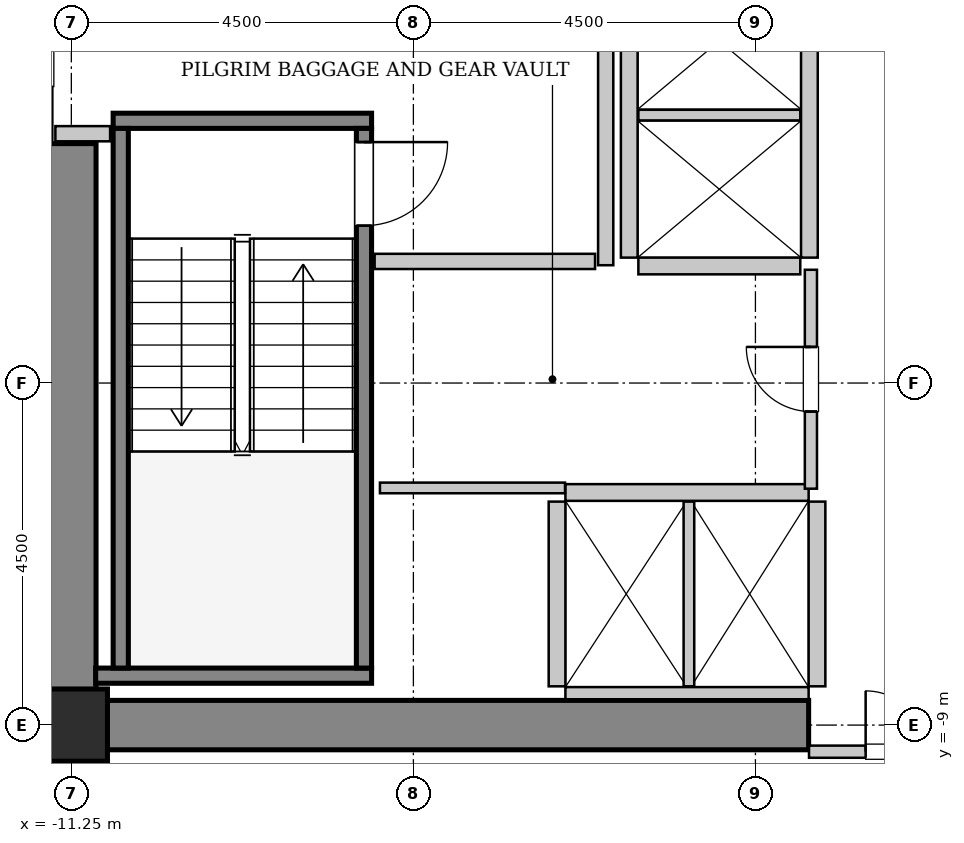
"""IFC4 building model, lengths in metres.
Left out: names, types, materials, properties, quantities, classifications, styles, units other than length and angle.
Written with IfcOpenShell. Run it as: python <this file> out.ifc"""

import sys

from ifc_helpers import new_model, si_unit, direction, frame, frame_2d, origin, origin_2d, place, context, subcontext, project, spatial, rectangle, hollow_rectangle, extrude, source, transform, mapped, element, fill, save


model = new_model("IFC4")
c1 = context("Model", 3, precision=1e-05, world=origin(), true_north=direction((0.0, 1.0)))
c2 = subcontext(c1, "Body", "Model", "MODEL_VIEW")
j1 = project(units=[si_unit("LENGTHUNIT", "METRE"), si_unit("PLANEANGLEUNIT", "RADIAN")], contexts=[c1])
p1 = place(None, origin())
s1 = spatial("IfcSite", under=j1, at=p1, CompositionType="ELEMENT")
p2 = place(p1, origin())
s2 = spatial("IfcBuilding", under=s1, at=p2, CompositionType="ELEMENT")
p3 = place(p2, frame((0.0, 0.0, 52.0)))
s3 = spatial("IfcBuildingStorey", under=s2, at=p3, CompositionType="ELEMENT", Elevation=52.0)
m1 = source(origin(), c2, "Body", "SweptSolid", [
    extrude(rectangle(XDim=10.025, YDim=0.65, at=frame_2d((5.012, 0.0))), origin(), (0.0, 0.0, 1.0), 3.8),
])
p4 = place(p3, frame((-11.575, -9.0, 0.0), z_axis=(0.0, 0.0, 1.0), x_axis=(1.0, 0.0, 0.0)))
e1 = element("IfcWall", 1, at=p4, inside=s3, PredefinedType="SHEAR", context=c2, shape_type="MappedRepresentation", body=[
    mapped(m1, transform((0.0, 0.0, 0.0), x_axis=(1.0, 0.0, 0.0), y_axis=(0.0, 1.0, 0.0), z_axis=(0.0, 0.0, 1.0), scale=1.0)),
])
m2 = source(origin(), c2, "Body", "SweptSolid", [
    extrude(rectangle(XDim=7.325, YDim=0.65, at=frame_2d((3.663, 0.0))), origin(), (0.0, 0.0, 1.0), 3.8),
])
p5 = place(p3, frame((-11.25, -8.675, 0.0), z_axis=(0.0, 0.0, 1.0), x_axis=(0.0, 1.0, 0.0)))
e2 = element("IfcWall", 2, at=p5, inside=s3, PredefinedType="SHEAR", context=c2, shape_type="MappedRepresentation", body=[
    mapped(m2, transform((0.0, 0.0, 0.0), x_axis=(1.0, 0.0, 0.0), y_axis=(0.0, 1.0, 0.0), z_axis=(0.0, 0.0, 1.0), scale=1.0)),
])
m3 = source(origin(), c2, "Body", "SweptSolid", [
    extrude(hollow_rectangle(XDim=0.95, YDim=0.95, WallThickness=0.045, InnerFilletRadius=0.045, OuterFilletRadius=0.09, at=origin_2d()), origin(), (0.0, 0.0, 1.0), 3.8),
])
p6 = place(p3, frame((-11.25, -9.0, 0.0), z_axis=(0.0, 0.0, 1.0), x_axis=(1.0, 0.0, 0.0)))
e3 = element("IfcColumn", 3, at=p6, inside=s3, PredefinedType="COLUMN", context=c2, shape_type="MappedRepresentation", body=[
    mapped(m3, transform((0.0, 0.0, 0.0), x_axis=(1.0, 0.0, 0.0), y_axis=(0.0, 1.0, 0.0), z_axis=(0.0, 0.0, 1.0), scale=1.0)),
])
m4 = source(origin(), c2, "Body", "SweptSolid", [
    extrude(rectangle(XDim=3.4, YDim=0.2, at=frame_2d((1.7, 0.0))), origin(), (0.0, 0.0, 1.0), 3.8),
])
p7 = place(p3, frame((-10.7, -1.05, 0.0), z_axis=(0.0, 0.0, 1.0), x_axis=(1.0, 0.0, 0.0)))
e4 = element("IfcWall", 4, at=p7, inside=s3, PredefinedType="SOLIDWALL", context=c2, shape_type="MappedRepresentation", body=[
    mapped(m4, transform((0.0, 0.0, 0.0), x_axis=(1.0, 0.0, 0.0), y_axis=(0.0, 1.0, 0.0), z_axis=(0.0, 0.0, 1.0), scale=1.0)),
])
m5 = source(origin(), c2, "Body", "SweptSolid", [
    extrude(rectangle(XDim=3.63, YDim=0.2, at=frame_2d((1.815, 0.0))), origin(), (0.0, 0.0, 1.0), 3.8),
])
p8 = place(p3, frame((-10.93, -8.35, 0.0), z_axis=(0.0, 0.0, 1.0), x_axis=(1.0, 0.0, 0.0)))
e5 = element("IfcWall", 5, at=p8, inside=s3, PredefinedType="SOLIDWALL", context=c2, shape_type="MappedRepresentation", body=[
    mapped(m5, transform((0.0, 0.0, 0.0), x_axis=(1.0, 0.0, 0.0), y_axis=(0.0, 1.0, 0.0), z_axis=(0.0, 0.0, 1.0), scale=1.0)),
])
m6 = source(origin(), c2, "Body", "SweptSolid", [
    extrude(rectangle(XDim=7.1, YDim=0.2, at=frame_2d((3.55, 0.0))), origin(), (0.0, 0.0, 1.0), 3.8),
])
p9 = place(p3, frame((-10.6, -1.15, 0.0), z_axis=(0.0, 0.0, 1.0), x_axis=(0.0, -1.0, 0.0)))
e6 = element("IfcWall", 6, at=p9, inside=s3, PredefinedType="SOLIDWALL", context=c2, shape_type="MappedRepresentation", body=[
    mapped(m6, transform((0.0, 0.0, 0.0), x_axis=(1.0, 0.0, 0.0), y_axis=(0.0, 1.0, 0.0), z_axis=(0.0, 0.0, 1.0), scale=1.0)),
])
p10 = place(p3, frame((-7.4, -1.15, 0.0), z_axis=(0.0, 0.0, 1.0), x_axis=(0.0, -1.0, 0.0)))
e7 = element("IfcWall", 7, at=p10, inside=s3, PredefinedType="SOLIDWALL", context=c2, shape_type="MappedRepresentation", body=[
    mapped(m6, transform((0.0, 0.0, 0.0), x_axis=(1.0, 0.0, 0.0), y_axis=(0.0, 1.0, 0.0), z_axis=(0.0, 0.0, 1.0), scale=1.0)),
])
p11 = place(p10, frame((0.18, 0.0, 0.0)))
e8 = element("IfcOpeningElement", 8, at=p11, cuts=e7, PredefinedType="OPENING", context=c2, shape_type="SweptSolid", body=[
    extrude(rectangle(XDim=1.1, YDim=2.15, at=frame_2d((0.55, 1.075))), frame((0.0, 0.11, 0.0), z_axis=(0.0, -1.0, 0.0), x_axis=(1.0, 0.0, 0.0)), (0.0, 0.0, 1.0), 0.22),
])
m7 = source(origin(), c2, "Body", "SweptSolid", [
    extrude(rectangle(XDim=3.2, YDim=0.22, at=frame_2d((1.6, 0.0))), origin(), (0.0, 0.0, 1.0), 3.535),
])
p12 = place(p3, frame((-1.55, -5.94, 0.0), z_axis=(0.0, 0.0, 1.0), x_axis=(-1.0, 0.0, 0.0)))
e9 = element("IfcWall", 9, at=p12, inside=s3, PredefinedType="SOLIDWALL", context=c2, shape_type="MappedRepresentation", body=[
    mapped(m7, transform((0.0, 0.0, 0.0), x_axis=(1.0, 0.0, 0.0), y_axis=(0.0, 1.0, 0.0), z_axis=(0.0, 0.0, 1.0), scale=1.0)),
])
m8 = source(origin(), c2, "Body", "SweptSolid", [
    extrude(rectangle(XDim=3.2, YDim=0.16, at=frame_2d((1.6, 0.0))), origin(), (0.0, 0.0, 1.0), 2.425),
])
p13 = place(p3, frame((-4.75, -8.58, 0.0), z_axis=(0.0, 0.0, 1.0), x_axis=(1.0, 0.0, 0.0)))
e10 = element("IfcWall", 10, at=p13, inside=s3, PredefinedType="PARTITIONING", context=c2, shape_type="MappedRepresentation", body=[
    mapped(m8, transform((0.0, 0.0, 0.0), x_axis=(1.0, 0.0, 0.0), y_axis=(0.0, 1.0, 0.0), z_axis=(0.0, 0.0, 1.0), scale=1.0)),
])
m9 = source(origin(), c2, "Body", "SweptSolid", [
    extrude(rectangle(XDim=2.43, YDim=0.22, at=frame_2d((1.215, 0.0))), origin(), (0.0, 0.0, 1.0), 3.535),
])
p14 = place(p3, frame((-4.86, -6.06, 0.0), z_axis=(0.0, 0.0, 1.0), x_axis=(0.0, -1.0, 0.0)))
e11 = element("IfcWall", 11, at=p14, inside=s3, PredefinedType="SOLIDWALL", context=c2, shape_type="MappedRepresentation", body=[
    mapped(m9, transform((0.0, 0.0, 0.0), x_axis=(1.0, 0.0, 0.0), y_axis=(0.0, 1.0, 0.0), z_axis=(0.0, 0.0, 1.0), scale=1.0)),
])
m10 = source(origin(), c2, "Body", "SweptSolid", [
    extrude(rectangle(XDim=2.43, YDim=0.14, at=frame_2d((1.215, 0.0))), origin(), (0.0, 0.0, 1.0), 3.535),
])
p15 = place(p3, frame((-3.125, -8.49, 0.0), z_axis=(0.0, 0.0, 1.0), x_axis=(0.0, 1.0, 0.0)))
e12 = element("IfcWall", 12, at=p15, inside=s3, PredefinedType="PARTITIONING", context=c2, shape_type="MappedRepresentation", body=[
    mapped(m10, transform((0.0, 0.0, 0.0), x_axis=(1.0, 0.0, 0.0), y_axis=(0.0, 1.0, 0.0), z_axis=(0.0, 0.0, 1.0), scale=1.0)),
])
p16 = place(p3, frame((-1.44, -8.49, 0.0), z_axis=(0.0, 0.0, 1.0), x_axis=(0.0, 1.0, 0.0)))
e13 = element("IfcWall", 13, at=p16, inside=s3, PredefinedType="SOLIDWALL", context=c2, shape_type="MappedRepresentation", body=[
    mapped(m9, transform((0.0, 0.0, 0.0), x_axis=(1.0, 0.0, 0.0), y_axis=(0.0, 1.0, 0.0), z_axis=(0.0, 0.0, 1.0), scale=1.0)),
])
m11 = source(origin(), c2, "Body", "SweptSolid", [
    extrude(rectangle(XDim=5.7, YDim=0.22, at=frame_2d((2.85, 0.0))), origin(), (0.0, 0.0, 1.0), 3.535),
])
for number, where, z_axis, x_axis in (
    (14, (-1.54, -2.85, 0.0), (0.0, 0.0, 1.0), (0.0, 1.0, 0.0)),
    (15, (-3.91, 2.85, 0.0), (0.0, 0.0, 1.0), (0.0, -1.0, 0.0)),
):
    element("IfcWall", number, at=place(p3, frame(where, z_axis=z_axis, x_axis=x_axis)), inside=s3, PredefinedType="SOLIDWALL", context=c2, shape_type="MappedRepresentation", body=[
        mapped(m11, transform((0.0, 0.0, 0.0), x_axis=(1.0, 0.0, 0.0), y_axis=(0.0, 1.0, 0.0), z_axis=(0.0, 0.0, 1.0), scale=1.0)),
    ])
m12 = source(origin(), c2, "Body", "SweptSolid", [
    extrude(rectangle(XDim=2.13, YDim=0.22, at=frame_2d((1.065, 0.0))), origin(), (0.0, 0.0, 1.0), 3.535),
])
p17 = place(p3, frame((-3.79, -2.96, 0.0), z_axis=(0.0, 0.0, 1.0), x_axis=(1.0, 0.0, 0.0)))
e16 = element("IfcWall", 16, at=p17, inside=s3, PredefinedType="SOLIDWALL", context=c2, shape_type="MappedRepresentation", body=[
    mapped(m12, transform((0.0, 0.0, 0.0), x_axis=(1.0, 0.0, 0.0), y_axis=(0.0, 1.0, 0.0), z_axis=(0.0, 0.0, 1.0), scale=1.0)),
])
m13 = source(origin(), c2, "Body", "SweptSolid", [
    extrude(rectangle(XDim=2.13, YDim=0.14, at=frame_2d((1.065, 0.0))), origin(), (0.0, 0.0, 1.0), 3.535),
])
p18 = place(p3, frame((-3.79, -0.975, 0.0), z_axis=(0.0, 0.0, 1.0), x_axis=(1.0, 0.0, 0.0)))
e17 = element("IfcWall", 17, at=p18, inside=s3, PredefinedType="PARTITIONING", context=c2, shape_type="MappedRepresentation", body=[
    mapped(m13, transform((0.0, 0.0, 0.0), x_axis=(1.0, 0.0, 0.0), y_axis=(0.0, 1.0, 0.0), z_axis=(0.0, 0.0, 1.0), scale=1.0)),
])
m14 = source(origin(), c2, "Body", "SweptSolid", [
    extrude(rectangle(XDim=5.9, YDim=0.2, at=frame_2d((2.95, 0.0))), origin(), (0.0, 0.0, 1.0), 3.535),
])
p19 = place(p3, frame((-4.22, -2.95, 0.0), z_axis=(0.0, 0.0, 1.0), x_axis=(0.0, 1.0, 0.0)))
e18 = element("IfcWall", 18, at=p19, inside=s3, PredefinedType="PARTITIONING", context=c2, shape_type="MappedRepresentation", body=[
    mapped(m14, transform((0.0, 0.0, 0.0), x_axis=(1.0, 0.0, 0.0), y_axis=(0.0, 1.0, 0.0), z_axis=(0.0, 0.0, 1.0), scale=1.0)),
])
m15 = source(origin(), c2, "Body", "SweptSolid", [
    extrude(rectangle(XDim=2.9, YDim=0.2, at=frame_2d((1.45, 0.0))), origin(), (0.0, 0.0, 1.0), 3.535),
])
p20 = place(p3, frame((-7.26, -2.9, 0.0), z_axis=(0.0, 0.0, 1.0), x_axis=(1.0, 0.0, 0.0)))
e19 = element("IfcWall", 19, at=p20, inside=s3, PredefinedType="PARTITIONING", context=c2, shape_type="MappedRepresentation", body=[
    mapped(m15, transform((0.0, 0.0, 0.0), x_axis=(1.0, 0.0, 0.0), y_axis=(0.0, 1.0, 0.0), z_axis=(0.0, 0.0, 1.0), scale=1.0)),
])
m16 = source(origin(), c2, "Body", "SweptSolid", [
    extrude(rectangle(XDim=0.72, YDim=0.2, at=frame_2d((0.36, 0.0))), origin(), (0.0, 0.0, 1.0), 3.535),
])
p21 = place(p3, frame((-11.46, -1.22, 0.0), z_axis=(0.0, 0.0, 1.0), x_axis=(1.0, 0.0, 0.0)))
e20 = element("IfcWall", 20, at=p21, inside=s3, PredefinedType="PARTITIONING", context=c2, shape_type="MappedRepresentation", body=[
    mapped(m16, transform((0.0, 0.0, 0.0), x_axis=(1.0, 0.0, 0.0), y_axis=(0.0, 1.0, 0.0), z_axis=(0.0, 0.0, 1.0), scale=1.0)),
])
m17 = source(origin(), c2, "Body", "SweptSolid", [
    extrude(rectangle(XDim=3.09, YDim=0.16, at=frame_2d((1.545, 0.0))), origin(), (0.0, 0.0, 1.0), 2.425),
])
p22 = place(p3, frame((-1.545, -9.35, 0.0), z_axis=(0.0, 0.0, 1.0), x_axis=(1.0, 0.0, 0.0)))
e21 = element("IfcWall", 21, at=p22, inside=s3, PredefinedType="PARTITIONING", context=c2, shape_type="MappedRepresentation", body=[
    mapped(m17, transform((0.0, 0.0, 0.0), x_axis=(1.0, 0.0, 0.0), y_axis=(0.0, 1.0, 0.0), z_axis=(0.0, 0.0, 1.0), scale=1.0)),
])
p23 = place(p22, frame((0.745, 0.0, 0.0)))
e22 = element("IfcOpeningElement", 22, at=p23, cuts=e21, PredefinedType="OPENING", context=c2, shape_type="SweptSolid", body=[
    extrude(rectangle(XDim=1.6, YDim=2.3, at=frame_2d((0.8, 1.15))), frame((0.0, 0.09, 0.0), z_axis=(0.0, -1.0, 0.0), x_axis=(1.0, 0.0, 0.0)), (0.0, 0.0, 1.0), 0.18),
])
m18 = source(origin(), c2, "Body", "SweptSolid", [
    extrude(rectangle(XDim=2.88, YDim=0.16, at=frame_2d((1.44, 0.0))), origin(), (0.0, 0.0, 1.0), 3.535),
])
p24 = place(p3, frame((-1.52, -5.89, 0.0), z_axis=(0.0, 0.0, 1.0), x_axis=(0.0, 1.0, 0.0)))
e23 = element("IfcWall", 23, at=p24, inside=s3, PredefinedType="PARTITIONING", context=c2, shape_type="MappedRepresentation", body=[
    mapped(m18, transform((0.0, 0.0, 0.0), x_axis=(1.0, 0.0, 0.0), y_axis=(0.0, 1.0, 0.0), z_axis=(0.0, 0.0, 1.0), scale=1.0)),
])
p25 = place(p24, frame((1.015, 0.0, 0.0)))
e24 = element("IfcOpeningElement", 24, at=p25, cuts=e23, PredefinedType="OPENING", context=c2, shape_type="SweptSolid", body=[
    extrude(rectangle(XDim=0.85, YDim=2.1, at=frame_2d((0.425, 1.05))), frame((0.0, 0.09, 0.0), z_axis=(0.0, -1.0, 0.0), x_axis=(1.0, 0.0, 0.0)), (0.0, 0.0, 1.0), 0.18),
])
m19 = source(origin(), c2, "Body", "SweptSolid", [
    extrude(rectangle(XDim=2.435, YDim=0.14, at=frame_2d((1.218, 0.0))), origin(), (0.0, 0.0, 1.0), 3.535),
])
p26 = place(p3, frame((-7.19, -5.88, 0.0), z_axis=(0.0, 0.0, 1.0), x_axis=(1.0, 0.0, 0.0)))
e25 = element("IfcWall", 25, at=p26, inside=s3, PredefinedType="PARTITIONING", context=c2, shape_type="MappedRepresentation", body=[
    mapped(m19, transform((0.0, 0.0, 0.0), x_axis=(1.0, 0.0, 0.0), y_axis=(0.0, 1.0, 0.0), z_axis=(0.0, 0.0, 1.0), scale=1.0)),
])
m20 = source(origin(), c2, "Body", "SweptSolid", [
    extrude(rectangle(XDim=1.1, YDim=2.15, at=frame_2d((0.55, 1.075))), frame((0.0, 0.025, 0.0), z_axis=(0.0, -1.0, 0.0), x_axis=(1.0, 0.0, 0.0)), (0.0, 0.0, 1.0), 0.05),
])
p27 = place(p11, origin())
e26 = element("IfcDoor", 26, at=p27, inside=s3, OperationType="SINGLE_SWING_LEFT", PredefinedType="DOOR", context=c2, shape_type="MappedRepresentation", body=[
    mapped(m20, transform((0.0, 0.0, 0.0), x_axis=(1.0, 0.0, 0.0), y_axis=(0.0, 1.0, 0.0), z_axis=(0.0, 0.0, 1.0), scale=1.0)),
])
fill(e8, e26)
m21 = source(origin(), c2, "Body", "SweptSolid", [
    extrude(rectangle(XDim=1.6, YDim=2.3, at=frame_2d((0.8, 1.15))), frame((0.0, 0.025, 0.0), z_axis=(0.0, -1.0, 0.0), x_axis=(1.0, 0.0, 0.0)), (0.0, 0.0, 1.0), 0.05),
])
p28 = place(p23, origin())
e27 = element("IfcDoor", 27, at=p28, inside=s3, OperationType="DOUBLE_DOOR_SINGLE_SWING", PredefinedType="DOOR", context=c2, shape_type="MappedRepresentation", body=[
    mapped(m21, transform((0.0, 0.0, 0.0), x_axis=(1.0, 0.0, 0.0), y_axis=(0.0, 1.0, 0.0), z_axis=(0.0, 0.0, 1.0), scale=1.0)),
])
fill(e22, e27)
m22 = source(origin(), c2, "Body", "SweptSolid", [
    extrude(rectangle(XDim=0.85, YDim=2.1, at=frame_2d((0.425, 1.05))), frame((0.0, 0.025, 0.0), z_axis=(0.0, -1.0, 0.0), x_axis=(1.0, 0.0, 0.0)), (0.0, 0.0, 1.0), 0.05),
])
p29 = place(p25, origin())
e28 = element("IfcDoor", 28, at=p29, inside=s3, OperationType="SINGLE_SWING_RIGHT", PredefinedType="DOOR", context=c2, shape_type="MappedRepresentation", body=[
    mapped(m22, transform((0.0, 0.0, 0.0), x_axis=(1.0, 0.0, 0.0), y_axis=(0.0, 1.0, 0.0), z_axis=(0.0, 0.0, 1.0), scale=1.0)),
])
fill(e24, e28)
save(model, sys.argv[1])
